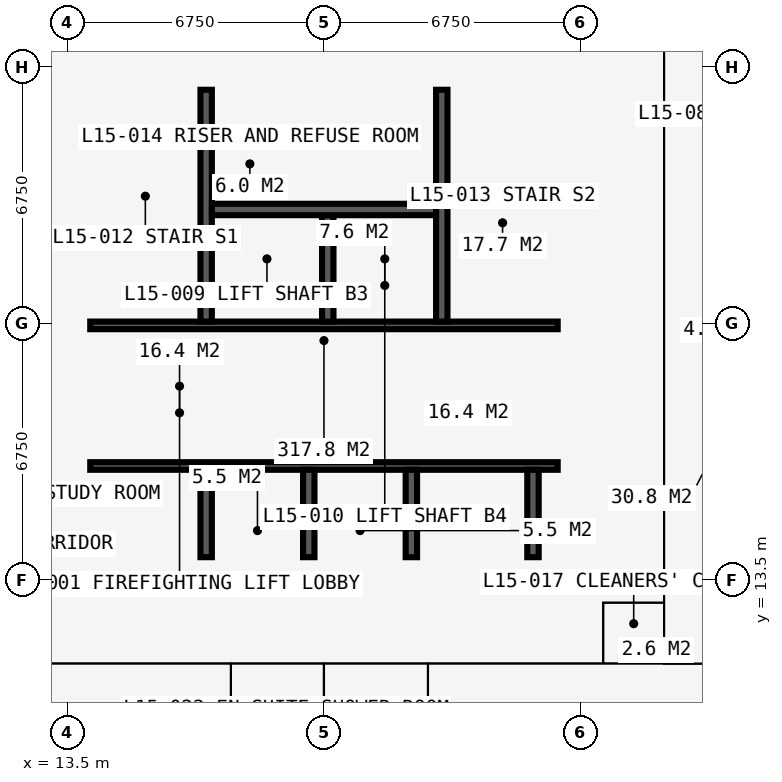
"""IFC4 building model, lengths in metres.
Left out: names, types, materials, properties, quantities, classifications, styles, units other than length and angle.
Written with IfcOpenShell. Run it as: python <this file> out.ifc"""

import sys

from ifc_helpers import new_model, si_unit, direction, frame, frame_2d, origin, place, context, subcontext, project, spatial, rectangle, extrude, element, fill, save


model = new_model("IFC4")
c1 = context("Model", 3, precision=1e-05, world=origin(), true_north=direction((0.0, 1.0)))
c2 = subcontext(c1, "Body", "Model", "MODEL_VIEW")
j1 = project(units=[si_unit("LENGTHUNIT", "METRE"), si_unit("PLANEANGLEUNIT", "RADIAN")], contexts=[c1])
p1 = place(None, origin())
s1 = spatial("IfcSite", under=j1, at=p1, CompositionType="ELEMENT")
p2 = place(p1, origin())
s2 = spatial("IfcBuilding", under=s1, at=p2, CompositionType="ELEMENT")
p3 = place(p2, frame((0.0, 0.0, 57.6)))
s3 = spatial("IfcBuildingStorey", under=s2, at=p3, CompositionType="ELEMENT", Elevation=57.6)
p4 = place(p3, frame((12.9, 13.5, 0.0), z_axis=(0.0, 0.0, 1.0), x_axis=(1.0, 0.0, 0.0)))
e1 = element("IfcWall", 1, at=p4, inside=s3, PredefinedType="SHEAR", context=c2, shape_type="SweptSolid", body=[
    extrude(rectangle(XDim=14.7, YDim=1.2, at=frame_2d((7.35, 0.0))), origin(), (0.0, 0.0, 1.0), 3.6),
])
p5 = place(p3, frame((27.0, 14.1, 0.0), z_axis=(0.0, 0.0, 1.0), x_axis=(0.0, 1.0, 0.0)))
e2 = element("IfcWall", 2, at=p5, inside=s3, PredefinedType="SHEAR", context=c2, shape_type="SweptSolid", body=[
    extrude(rectangle(XDim=12.3, YDim=1.2, at=frame_2d((6.15, 0.0))), origin(), (0.0, 0.0, 1.0), 3.6),
])
p6 = place(p5, frame((3.65, 0.0, 0.0)))
e3 = element("IfcOpeningElement", 3, at=p6, cuts=e2, PredefinedType="OPENING", context=c2, shape_type="SweptSolid", body=[
    extrude(rectangle(XDim=1.2, YDim=2.2, at=frame_2d((0.6, 1.1))), frame((0.0, 0.61, 0.0), z_axis=(0.0, -1.0, 0.0), x_axis=(1.0, 0.0, 0.0)), (0.0, 0.0, 1.0), 1.22),
])
p7 = place(p3, frame((27.6, 27.0, 0.0), z_axis=(0.0, 0.0, 1.0), x_axis=(-1.0, 0.0, 0.0)))
e4 = element("IfcWall", 4, at=p7, inside=s3, PredefinedType="SHEAR", context=c2, shape_type="SweptSolid", body=[
    extrude(rectangle(XDim=14.7, YDim=1.2, at=frame_2d((7.35, 0.0))), origin(), (0.0, 0.0, 1.0), 3.6),
])
p8 = place(p7, frame((5.225, 0.0, 0.0)))
e5 = element("IfcOpeningElement", 5, at=p8, cuts=e4, PredefinedType="OPENING", context=c2, shape_type="SweptSolid", body=[
    extrude(rectangle(XDim=0.9, YDim=2.2, at=frame_2d((0.45, 1.1))), frame((0.0, 0.61, 0.0), z_axis=(0.0, -1.0, 0.0), x_axis=(1.0, 0.0, 0.0)), (0.0, 0.0, 1.0), 1.22),
])
p9 = place(p7, frame((8.2, 0.0, 0.0)))
e6 = element("IfcOpeningElement", 6, at=p9, cuts=e4, PredefinedType="OPENING", context=c2, shape_type="SweptSolid", body=[
    extrude(rectangle(XDim=1.0, YDim=2.2, at=frame_2d((0.5, 1.1))), frame((0.0, 0.61, 0.0), z_axis=(0.0, -1.0, 0.0), x_axis=(1.0, 0.0, 0.0)), (0.0, 0.0, 1.0), 1.22),
])
p10 = place(p3, frame((13.5, 26.4, 0.0), z_axis=(0.0, 0.0, 1.0), x_axis=(0.0, -1.0, 0.0)))
e7 = element("IfcWall", 7, at=p10, inside=s3, PredefinedType="SHEAR", context=c2, shape_type="SweptSolid", body=[
    extrude(rectangle(XDim=12.3, YDim=1.2, at=frame_2d((6.15, 0.0))), origin(), (0.0, 0.0, 1.0), 3.6),
])
p11 = place(p10, frame((7.45, 0.0, 0.0)))
e8 = element("IfcOpeningElement", 8, at=p11, cuts=e7, PredefinedType="OPENING", context=c2, shape_type="SweptSolid", body=[
    extrude(rectangle(XDim=1.2, YDim=2.2, at=frame_2d((0.6, 1.1))), frame((0.0, 0.61, 0.0), z_axis=(0.0, -1.0, 0.0), x_axis=(1.0, 0.0, 0.0)), (0.0, 0.0, 1.0), 1.22),
])
p12 = place(p3, frame((14.1, 16.5, 0.0), z_axis=(0.0, 0.0, 1.0), x_axis=(1.0, 0.0, 0.0)))
e9 = element("IfcWall", 9, at=p12, inside=s3, PredefinedType="SHEAR", context=c2, shape_type="SweptSolid", body=[
    extrude(rectangle(XDim=12.3, YDim=0.2, at=frame_2d((6.15, 0.0))), origin(), (0.0, 0.0, 1.0), 3.6),
])
p13 = place(p12, frame((0.9, 0.0, 0.0)))
e10 = element("IfcOpeningElement", 10, at=p13, cuts=e9, PredefinedType="OPENING", context=c2, shape_type="SweptSolid", body=[
    extrude(rectangle(XDim=1.1, YDim=2.2, at=frame_2d((0.55, 1.1))), frame((0.0, 0.11, 0.0), z_axis=(0.0, -1.0, 0.0), x_axis=(1.0, 0.0, 0.0)), (0.0, 0.0, 1.0), 0.22),
])
p14 = place(p12, frame((9.5, 0.0, 0.0)))
e11 = element("IfcOpeningElement", 11, at=p14, cuts=e9, PredefinedType="OPENING", context=c2, shape_type="SweptSolid", body=[
    extrude(rectangle(XDim=1.1, YDim=2.2, at=frame_2d((0.55, 1.1))), frame((0.0, 0.11, 0.0), z_axis=(0.0, -1.0, 0.0), x_axis=(1.0, 0.0, 0.0)), (0.0, 0.0, 1.0), 0.22),
])
p15 = place(p3, frame((14.1, 20.2, 0.0), z_axis=(0.0, 0.0, 1.0), x_axis=(1.0, 0.0, 0.0)))
e12 = element("IfcWall", 12, at=p15, inside=s3, PredefinedType="SHEAR", context=c2, shape_type="SweptSolid", body=[
    extrude(rectangle(XDim=12.3, YDim=0.2, at=frame_2d((6.15, 0.0))), origin(), (0.0, 0.0, 1.0), 3.6),
])
p16 = place(p15, frame((0.35, 0.0, 0.0)))
e13 = element("IfcOpeningElement", 13, at=p16, cuts=e12, PredefinedType="OPENING", context=c2, shape_type="SweptSolid", body=[
    extrude(rectangle(XDim=1.1, YDim=2.2, at=frame_2d((0.55, 1.1))), frame((0.0, 0.11, 0.0), z_axis=(0.0, -1.0, 0.0), x_axis=(1.0, 0.0, 0.0)), (0.0, 0.0, 1.0), 0.22),
])
p17 = place(p15, frame((9.75, 0.0, 0.0)))
e14 = element("IfcOpeningElement", 14, at=p17, cuts=e12, PredefinedType="OPENING", context=c2, shape_type="SweptSolid", body=[
    extrude(rectangle(XDim=1.1, YDim=2.2, at=frame_2d((0.55, 1.1))), frame((0.0, 0.11, 0.0), z_axis=(0.0, -1.0, 0.0), x_axis=(1.0, 0.0, 0.0)), (0.0, 0.0, 1.0), 0.22),
])
for number, where, z_axis, x_axis in (
    (15, (17.15, 20.3, 0.0), (0.0, 0.0, 1.0), (0.0, 1.0, 0.0)),
    (16, (23.35, 20.3, 0.0), (0.0, 0.0, 1.0), (0.0, 1.0, 0.0)),
):
    element("IfcWall", number, at=place(p3, frame(where, z_axis=z_axis, x_axis=x_axis)), inside=s3, PredefinedType="SHEAR", context=c2, shape_type="SweptSolid", body=[
        extrude(rectangle(XDim=6.1, YDim=0.3, at=frame_2d((3.05, 0.0))), origin(), (0.0, 0.0, 1.0), 3.6),
    ])
p18 = place(p3, frame((20.35, 20.3, 0.0), z_axis=(0.0, 0.0, 1.0), x_axis=(0.0, 1.0, 0.0)))
e17 = element("IfcWall", 17, at=p18, inside=s3, PredefinedType="SHEAR", context=c2, shape_type="SweptSolid", body=[
    extrude(rectangle(XDim=2.8, YDim=0.3, at=frame_2d((1.4, 0.0))), origin(), (0.0, 0.0, 1.0), 3.6),
])
p19 = place(p3, frame((17.3, 23.25, 0.0), z_axis=(0.0, 0.0, 1.0), x_axis=(1.0, 0.0, 0.0)))
e18 = element("IfcWall", 18, at=p19, inside=s3, PredefinedType="SHEAR", context=c2, shape_type="SweptSolid", body=[
    extrude(rectangle(XDim=5.9, YDim=0.3, at=frame_2d((2.95, 0.0))), origin(), (0.0, 0.0, 1.0), 3.6),
])
for number, where, z_axis, x_axis in (
    (19, (17.15, 14.1, 0.0), (0.0, 0.0, 1.0), (0.0, 1.0, 0.0)),
    (20, (19.85, 14.1, 0.0), (0.0, 0.0, 1.0), (0.0, 1.0, 0.0)),
    (21, (22.55, 14.1, 0.0), (0.0, 0.0, 1.0), (0.0, 1.0, 0.0)),
    (22, (25.75, 14.1, 0.0), (0.0, 0.0, 1.0), (0.0, 1.0, 0.0)),
):
    element("IfcWall", number, at=place(p3, frame(where, z_axis=z_axis, x_axis=x_axis)), inside=s3, PredefinedType="SHEAR", context=c2, shape_type="SweptSolid", body=[
        extrude(rectangle(XDim=2.3, YDim=0.3, at=frame_2d((1.15, 0.0))), origin(), (0.0, 0.0, 1.0), 3.6),
    ])
p20 = place(p3, frame((18.875, 16.6, 0.0), z_axis=(0.0, 0.0, 1.0), x_axis=(0.0, 1.0, 0.0)))
e23 = element("IfcWall", 23, at=p20, inside=s3, PredefinedType="PARTITIONING", context=c2, shape_type="SweptSolid", body=[
    extrude(rectangle(XDim=3.5, YDim=0.15, at=frame_2d((1.75, 0.0))), origin(), (0.0, 0.0, 1.0), 3.375),
])
p21 = place(p20, frame((1.15, 0.0, 0.0)))
e24 = element("IfcOpeningElement", 24, at=p21, cuts=e23, PredefinedType="OPENING", context=c2, shape_type="SweptSolid", body=[
    extrude(rectangle(XDim=1.2, YDim=2.2, at=frame_2d((0.6, 1.1))), frame((0.0, 0.085, 0.0), z_axis=(0.0, -1.0, 0.0), x_axis=(1.0, 0.0, 0.0)), (0.0, 0.0, 1.0), 0.17),
])
p22 = place(p3, frame((21.625, 16.6, 0.0), z_axis=(0.0, 0.0, 1.0), x_axis=(0.0, 1.0, 0.0)))
e25 = element("IfcWall", 25, at=p22, inside=s3, PredefinedType="PARTITIONING", context=c2, shape_type="SweptSolid", body=[
    extrude(rectangle(XDim=3.5, YDim=0.15, at=frame_2d((1.75, 0.0))), origin(), (0.0, 0.0, 1.0), 3.375),
])
p23 = place(p22, frame((1.15, 0.0, 0.0)))
e26 = element("IfcOpeningElement", 26, at=p23, cuts=e25, PredefinedType="OPENING", context=c2, shape_type="SweptSolid", body=[
    extrude(rectangle(XDim=1.2, YDim=2.2, at=frame_2d((0.6, 1.1))), frame((0.0, 0.085, 0.0), z_axis=(0.0, -1.0, 0.0), x_axis=(1.0, 0.0, 0.0)), (0.0, 0.0, 1.0), 0.17),
])
p24 = place(p3, frame((20.12, 16.6, 0.0), z_axis=(0.0, 0.0, 1.0), x_axis=(0.0, 1.0, 0.0)))
e27 = element("IfcWall", 27, at=p24, inside=s3, PredefinedType="PARTITIONING", context=c2, shape_type="SweptSolid", body=[
    extrude(rectangle(XDim=3.5, YDim=0.15, at=frame_2d((1.75, 0.0))), origin(), (0.0, 0.0, 1.0), 3.375),
])
p25 = place(p3, frame((19.375, 23.4, 0.0), z_axis=(0.0, 0.0, 1.0), x_axis=(0.0, 1.0, 0.0)))
e28 = element("IfcWall", 28, at=p25, inside=s3, PredefinedType="PARTITIONING", context=c2, shape_type="SweptSolid", body=[
    extrude(rectangle(XDim=3.0, YDim=0.15, at=frame_2d((1.5, 0.0))), origin(), (0.0, 0.0, 1.0), 3.375),
])
p26 = place(p3, frame((10.125, 11.3, 0.0), z_axis=(0.0, 0.0, 1.0), x_axis=(1.0, 0.0, 0.0)))
e29 = element("IfcWall", 29, at=p26, inside=s3, PredefinedType="PARTITIONING", context=c2, shape_type="SweptSolid", body=[
    extrude(rectangle(XDim=20.675, YDim=0.15, at=frame_2d((10.337, 0.0))), origin(), (0.0, 0.0, 1.0), 3.375),
])
p27 = place(p26, frame((8.375, 0.0, 0.0)))
e30 = element("IfcOpeningElement", 30, at=p27, cuts=e29, PredefinedType="OPENING", context=c2, shape_type="SweptSolid", body=[
    extrude(rectangle(XDim=1.0, YDim=2.2, at=frame_2d((0.5, 1.1))), frame((0.0, 0.085, 0.0), z_axis=(0.0, -1.0, 0.0), x_axis=(1.0, 0.0, 0.0)), (0.0, 0.0, 1.0), 0.17),
])
p28 = place(p26, frame((10.975, 0.0, 0.0)))
e31 = element("IfcOpeningElement", 31, at=p28, cuts=e29, PredefinedType="OPENING", context=c2, shape_type="SweptSolid", body=[
    extrude(rectangle(XDim=1.0, YDim=2.2, at=frame_2d((0.5, 1.1))), frame((0.0, 0.085, 0.0), z_axis=(0.0, -1.0, 0.0), x_axis=(1.0, 0.0, 0.0)), (0.0, 0.0, 1.0), 0.17),
])
p29 = place(p26, frame((3.925, 0.0, 0.0)))
e32 = element("IfcOpeningElement", 32, at=p29, cuts=e29, PredefinedType="OPENING", context=c2, shape_type="SweptSolid", body=[
    extrude(rectangle(XDim=0.95, YDim=2.2, at=frame_2d((0.475, 1.1))), frame((0.0, 0.085, 0.0), z_axis=(0.0, -1.0, 0.0), x_axis=(1.0, 0.0, 0.0)), (0.0, 0.0, 1.0), 0.17),
])
p30 = place(p3, frame((17.8, 5.65, 0.0), z_axis=(0.0, 0.0, 1.0), x_axis=(0.0, 1.0, 0.0)))
e33 = element("IfcWall", 33, at=p30, inside=s3, PredefinedType="PARTITIONING", context=c2, shape_type="SweptSolid", body=[
    extrude(rectangle(XDim=5.65, YDim=0.15, at=frame_2d((2.825, 0.0))), origin(), (0.0, 0.0, 1.0), 3.375),
])
p31 = place(p3, frame((20.25, -0.734, 0.0), z_axis=(0.0, 0.0, 1.0), x_axis=(0.0, 1.0, 0.0)))
e34 = element("IfcWall", 34, at=p31, inside=s3, PredefinedType="PARTITIONING", context=c2, shape_type="SweptSolid", body=[
    extrude(rectangle(XDim=12.034, YDim=0.15, at=frame_2d((6.017, 0.0))), origin(), (0.0, 0.0, 1.0), 2.61),
])
p32 = place(p3, frame((22.988, 5.65, 0.0), z_axis=(0.0, 0.0, 1.0), x_axis=(0.0, 1.0, 0.0)))
e35 = element("IfcWall", 35, at=p32, inside=s3, PredefinedType="PARTITIONING", context=c2, shape_type="SweptSolid", body=[
    extrude(rectangle(XDim=5.65, YDim=0.15, at=frame_2d((2.825, 0.0))), origin(), (0.0, 0.0, 1.0), 3.375),
])
p33 = place(p3, frame((27.6, 11.3, 0.0), z_axis=(0.0, 0.0, 1.0), x_axis=(0.0, 1.0, 0.0)))
e36 = element("IfcWall", 36, at=p33, inside=s3, PredefinedType="PARTITIONING", context=c2, shape_type="SweptSolid", body=[
    extrude(rectangle(XDim=1.6, YDim=0.15, at=frame_2d((0.8, 0.0))), origin(), (0.0, 0.0, 1.0), 3.375),
])
p34 = place(p33, frame((0.3, 0.0, 0.0)))
e37 = element("IfcOpeningElement", 37, at=p34, cuts=e36, PredefinedType="OPENING", context=c2, shape_type="SweptSolid", body=[
    extrude(rectangle(XDim=0.95, YDim=2.2, at=frame_2d((0.475, 1.1))), frame((0.0, 0.085, 0.0), z_axis=(0.0, -1.0, 0.0), x_axis=(1.0, 0.0, 0.0)), (0.0, 0.0, 1.0), 0.17),
])
p35 = place(p3, frame((27.6, 12.9, 0.0), z_axis=(0.0, 0.0, 1.0), x_axis=(1.0, 0.0, 0.0)))
e38 = element("IfcWall", 38, at=p35, inside=s3, PredefinedType="PARTITIONING", context=c2, shape_type="SweptSolid", body=[
    extrude(rectangle(XDim=1.6, YDim=0.15, at=frame_2d((0.8, 0.0))), origin(), (0.0, 0.0, 1.0), 2.877),
])
p36 = place(p3, frame((29.2, 11.3, 0.0), z_axis=(0.0, 0.0, 1.0), x_axis=(0.0, 1.0, 0.0)))
e39 = element("IfcWall", 39, at=p36, inside=s3, PredefinedType="PARTITIONING", context=c2, shape_type="SweptSolid", body=[
    extrude(rectangle(XDim=17.9, YDim=0.2, at=frame_2d((8.95, 0.0))), origin(), (0.0, 0.0, 1.0), 3.375),
])
p37 = place(p36, frame((8.35, 0.0, 0.0)))
e40 = element("IfcOpeningElement", 40, at=p37, cuts=e39, PredefinedType="OPENING", context=c2, shape_type="SweptSolid", body=[
    extrude(rectangle(XDim=1.2, YDim=2.2, at=frame_2d((0.6, 1.1))), frame((0.0, 0.11, 0.0), z_axis=(0.0, -1.0, 0.0), x_axis=(1.0, 0.0, 0.0)), (0.0, 0.0, 1.0), 0.22),
])
p38 = place(p3, frame((29.2, 25.7, 0.0), z_axis=(0.0, 0.0, 1.0), x_axis=(1.0, 0.0, 0.0)))
e41 = element("IfcWall", 41, at=p38, inside=s3, PredefinedType="SHEAR", context=c2, shape_type="SweptSolid", body=[
    extrude(rectangle(XDim=3.45, YDim=0.1, at=frame_2d((1.725, 0.0))), origin(), (0.0, 0.0, 1.0), 3.375),
])
p39 = place(p13, origin())
e42 = element("IfcDoor", 42, at=p39, inside=s3, OperationType="DOUBLE_DOOR_SLIDING", PredefinedType="DOOR", context=c2, shape_type="SweptSolid", body=[
    extrude(rectangle(XDim=1.1, YDim=2.2, at=frame_2d((0.55, 1.1))), frame((0.0, 0.025, 0.0), z_axis=(0.0, -1.0, 0.0), x_axis=(1.0, 0.0, 0.0)), (0.0, 0.0, 1.0), 0.05),
])
fill(e10, e42)
p40 = place(p14, origin())
e43 = element("IfcDoor", 43, at=p40, inside=s3, OperationType="DOUBLE_DOOR_SLIDING", PredefinedType="DOOR", context=c2, shape_type="SweptSolid", body=[
    extrude(rectangle(XDim=1.1, YDim=2.2, at=frame_2d((0.55, 1.1))), frame((0.0, 0.025, 0.0), z_axis=(0.0, -1.0, 0.0), x_axis=(1.0, 0.0, 0.0)), (0.0, 0.0, 1.0), 0.05),
])
fill(e11, e43)
p41 = place(p11, origin())
e44 = element("IfcDoor", 44, at=p41, inside=s3, OperationType="DOUBLE_DOOR_SINGLE_SWING", PredefinedType="DOOR", context=c2, shape_type="SweptSolid", body=[
    extrude(rectangle(XDim=1.2, YDim=2.2, at=frame_2d((0.6, 1.1))), frame((0.0, 0.025, 0.0), z_axis=(0.0, -1.0, 0.0), x_axis=(1.0, 0.0, 0.0)), (0.0, 0.0, 1.0), 0.05),
])
fill(e8, e44)
p42 = place(p6, origin())
e45 = element("IfcDoor", 45, at=p42, inside=s3, OperationType="DOUBLE_DOOR_SINGLE_SWING", PredefinedType="DOOR", context=c2, shape_type="SweptSolid", body=[
    extrude(rectangle(XDim=1.2, YDim=2.2, at=frame_2d((0.6, 1.1))), frame((0.0, 0.025, 0.0), z_axis=(0.0, -1.0, 0.0), x_axis=(1.0, 0.0, 0.0)), (0.0, 0.0, 1.0), 0.05),
])
fill(e3, e45)
p43 = place(p21, origin())
e46 = element("IfcDoor", 46, at=p43, inside=s3, OperationType="DOUBLE_DOOR_SINGLE_SWING", PredefinedType="DOOR", context=c2, shape_type="SweptSolid", body=[
    extrude(rectangle(XDim=1.2, YDim=2.2, at=frame_2d((0.6, 1.1))), frame((0.0, 0.025, 0.0), z_axis=(0.0, -1.0, 0.0), x_axis=(1.0, 0.0, 0.0)), (0.0, 0.0, 1.0), 0.05),
])
fill(e24, e46)
p44 = place(p23, origin())
e47 = element("IfcDoor", 47, at=p44, inside=s3, OperationType="DOUBLE_DOOR_SINGLE_SWING", PredefinedType="DOOR", context=c2, shape_type="SweptSolid", body=[
    extrude(rectangle(XDim=1.2, YDim=2.2, at=frame_2d((0.6, 1.1))), frame((0.0, 0.025, 0.0), z_axis=(0.0, -1.0, 0.0), x_axis=(1.0, 0.0, 0.0)), (0.0, 0.0, 1.0), 0.05),
])
fill(e26, e47)
p45 = place(p8, origin())
e48 = element("IfcDoor", 48, at=p45, inside=s3, OperationType="SINGLE_SWING_LEFT", PredefinedType="DOOR", context=c2, shape_type="SweptSolid", body=[
    extrude(rectangle(XDim=0.9, YDim=2.2, at=frame_2d((0.45, 1.1))), frame((0.0, 0.4, 0.0), z_axis=(0.0, -1.0, 0.0), x_axis=(1.0, 0.0, 0.0)), (0.0, 0.0, 1.0), 0.8),
])
fill(e5, e48)
p46 = place(p9, origin())
e49 = element("IfcDoor", 49, at=p46, inside=s3, OperationType="SINGLE_SWING_LEFT", PredefinedType="DOOR", context=c2, shape_type="SweptSolid", body=[
    extrude(rectangle(XDim=1.0, YDim=2.2, at=frame_2d((0.5, 1.1))), frame((0.0, 0.025, 0.0), z_axis=(0.0, -1.0, 0.0), x_axis=(1.0, 0.0, 0.0)), (0.0, 0.0, 1.0), 0.05),
])
fill(e6, e49)
p47 = place(p16, origin())
e50 = element("IfcDoor", 50, at=p47, inside=s3, OperationType="SINGLE_SWING_LEFT", PredefinedType="DOOR", context=c2, shape_type="SweptSolid", body=[
    extrude(rectangle(XDim=1.1, YDim=2.2, at=frame_2d((0.55, 1.1))), frame((0.0, 0.025, 0.0), z_axis=(0.0, -1.0, 0.0), x_axis=(1.0, 0.0, 0.0)), (0.0, 0.0, 1.0), 0.05),
])
fill(e13, e50)
p48 = place(p17, origin())
e51 = element("IfcDoor", 51, at=p48, inside=s3, OperationType="SINGLE_SWING_LEFT", PredefinedType="DOOR", context=c2, shape_type="SweptSolid", body=[
    extrude(rectangle(XDim=1.1, YDim=2.2, at=frame_2d((0.55, 1.1))), frame((0.0, 0.025, 0.0), z_axis=(0.0, -1.0, 0.0), x_axis=(1.0, 0.0, 0.0)), (0.0, 0.0, 1.0), 0.05),
])
fill(e14, e51)
p49 = place(p34, origin())
e52 = element("IfcDoor", 52, at=p49, inside=s3, OperationType="SINGLE_SWING_LEFT", PredefinedType="DOOR", context=c2, shape_type="SweptSolid", body=[
    extrude(rectangle(XDim=0.95, YDim=2.2, at=frame_2d((0.475, 1.1))), frame((0.0, 0.025, 0.0), z_axis=(0.0, -1.0, 0.0), x_axis=(1.0, 0.0, 0.0)), (0.0, 0.0, 1.0), 0.05),
])
fill(e37, e52)
p50 = place(p27, origin())
e53 = element("IfcDoor", 53, at=p50, inside=s3, OperationType="SINGLE_SWING_LEFT", PredefinedType="DOOR", context=c2, shape_type="SweptSolid", body=[
    extrude(rectangle(XDim=1.0, YDim=2.2, at=frame_2d((0.5, 1.1))), frame((0.0, 0.025, 0.0), z_axis=(0.0, -1.0, 0.0), x_axis=(1.0, 0.0, 0.0)), (0.0, 0.0, 1.0), 0.05),
])
fill(e30, e53)
p51 = place(p28, origin())
e54 = element("IfcDoor", 54, at=p51, inside=s3, OperationType="SINGLE_SWING_LEFT", PredefinedType="DOOR", context=c2, shape_type="SweptSolid", body=[
    extrude(rectangle(XDim=1.0, YDim=2.2, at=frame_2d((0.5, 1.1))), frame((0.0, 0.025, 0.0), z_axis=(0.0, -1.0, 0.0), x_axis=(1.0, 0.0, 0.0)), (0.0, 0.0, 1.0), 0.05),
])
fill(e31, e54)
p52 = place(p29, origin())
e55 = element("IfcDoor", 55, at=p52, inside=s3, OperationType="SINGLE_SWING_LEFT", PredefinedType="DOOR", context=c2, shape_type="SweptSolid", body=[
    extrude(rectangle(XDim=0.95, YDim=2.2, at=frame_2d((0.475, 1.1))), frame((0.0, 0.025, 0.0), z_axis=(0.0, -1.0, 0.0), x_axis=(1.0, 0.0, 0.0)), (0.0, 0.0, 1.0), 0.05),
])
fill(e32, e55)
p53 = place(p37, origin())
e56 = element("IfcDoor", 56, at=p53, inside=s3, OperationType="DOUBLE_DOOR_SINGLE_SWING", PredefinedType="DOOR", context=c2, shape_type="SweptSolid", body=[
    extrude(rectangle(XDim=1.2, YDim=2.2, at=frame_2d((0.6, 1.1))), frame((0.0, 0.025, 0.0), z_axis=(0.0, -1.0, 0.0), x_axis=(1.0, 0.0, 0.0)), (0.0, 0.0, 1.0), 0.05),
])
fill(e40, e56)
save(model, sys.argv[1])
